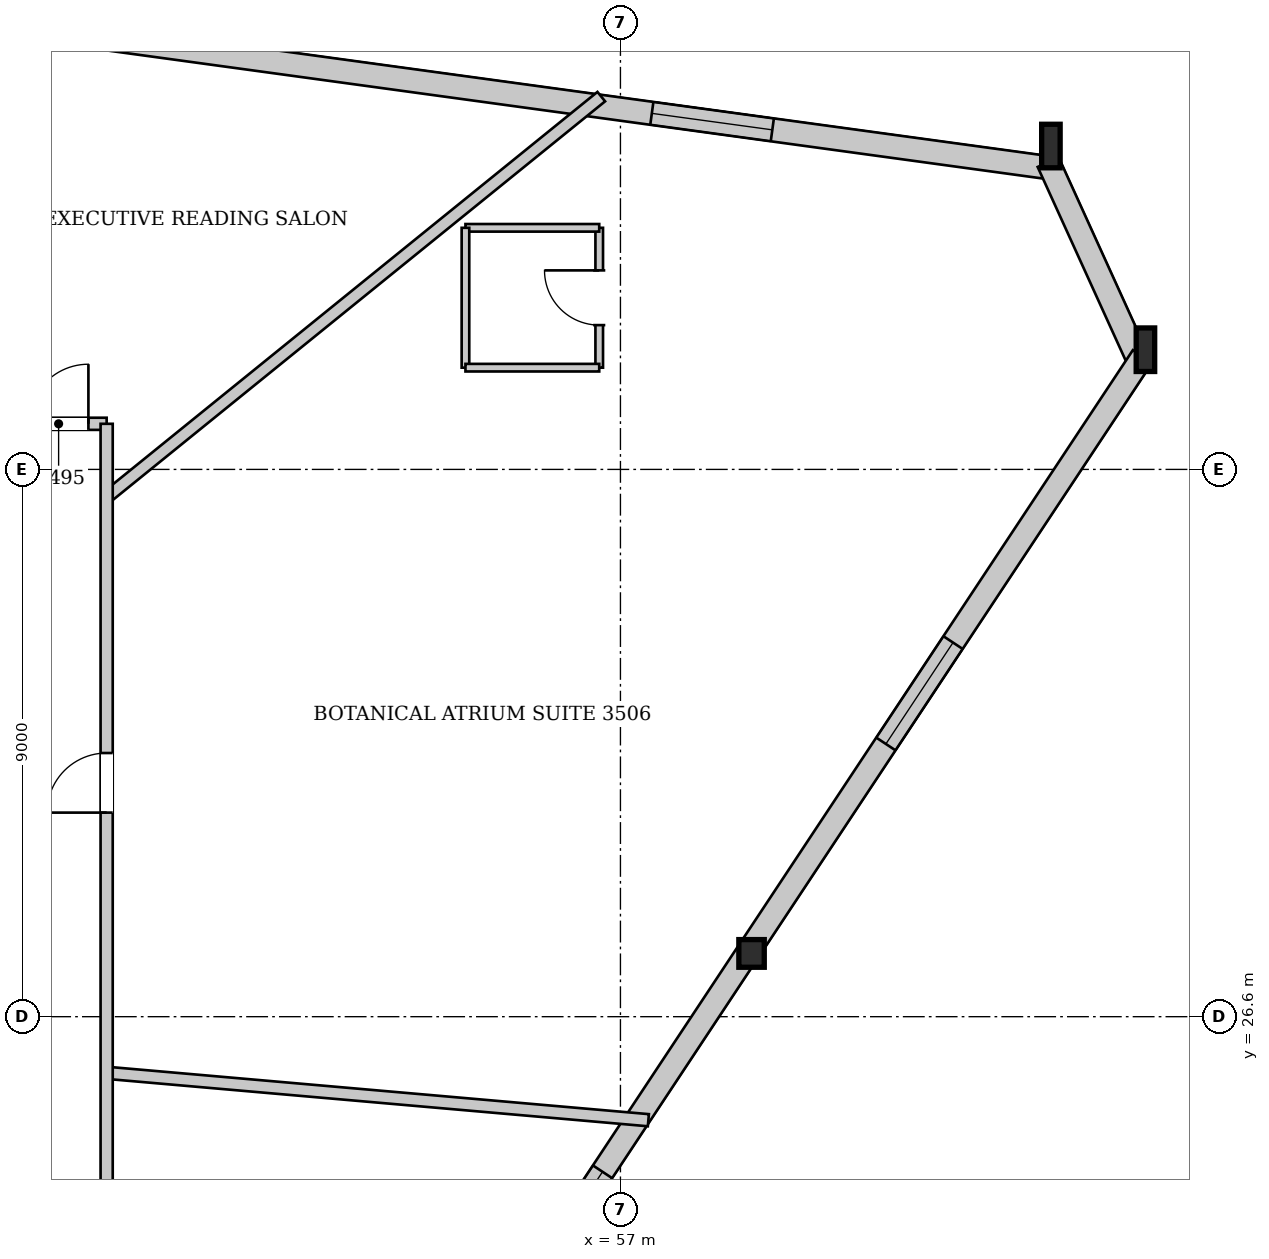
"""IFC4 building model, lengths in metres.
Left out: names, types, materials, properties, quantities, classifications, styles, units other than length and angle.
Written with IfcOpenShell. Run it as: python <this file> out.ifc"""

import sys

from ifc_helpers import new_model, si_unit, direction, frame, frame_2d, origin, origin_2d, place, context, subcontext, project, spatial, rectangle, i_section, extrude, source, transform, mapped, element, fill, save


model = new_model("IFC4")
c1 = context("Model", 3, precision=1e-05, world=origin(), true_north=direction((0.0, 1.0)))
c2 = subcontext(c1, "Body", "Model", "MODEL_VIEW")
j1 = project(units=[si_unit("LENGTHUNIT", "METRE"), si_unit("PLANEANGLEUNIT", "RADIAN")], contexts=[c1])
p1 = place(None, origin())
s1 = spatial("IfcSite", under=j1, at=p1, CompositionType="ELEMENT")
p2 = place(p1, origin())
s2 = spatial("IfcBuilding", under=s1, at=p2, CompositionType="ELEMENT")
p3 = place(p2, frame((0.0, 0.0, 134.1)))
s3 = spatial("IfcBuildingStorey", under=s2, at=p3, CompositionType="ELEMENT", Elevation=134.1)
m1 = source(origin(), c2, "Body", "SweptSolid", [
    extrude(i_section(OverallWidth=0.304, OverallDepth=0.716, WebThickness=0.021, FlangeThickness=0.04, at=origin_2d()), origin(), (0.0, 0.0, 1.0), 3.865),
])
p4 = place(p3, frame((65.744, 37.352, 0.0), z_axis=(-0.056968374746, 0.111915698503, 0.992083404108), x_axis=(-0.891185296634, -0.453639468151, 0.0)))
e1 = element("IfcColumn", 1, at=p4, inside=s3, PredefinedType="COLUMN", context=c2, shape_type="MappedRepresentation", body=[
    mapped(m1, transform((0.0, 0.0, 0.0), x_axis=(1.0, 0.0, 0.0), y_axis=(0.0, 1.0, 0.0), z_axis=(0.0, 0.0, 1.0), scale=1.0)),
])
m2 = source(origin(), c2, "Body", "SweptSolid", [
    extrude(i_section(OverallWidth=0.304, OverallDepth=0.716, WebThickness=0.021, FlangeThickness=0.04, at=origin_2d()), origin(), (0.0, 0.0, 1.0), 3.862),
])
p5 = place(p3, frame((64.208, 40.731, 0.0), z_axis=(-0.066446667597, 0.096666940776, 0.993096341211), x_axis=(-0.824089099315, -0.566460198417, 0.0)))
e2 = element("IfcColumn", 2, at=p5, inside=s3, PredefinedType="COLUMN", context=c2, shape_type="MappedRepresentation", body=[
    mapped(m2, transform((0.0, 0.0, 0.0), x_axis=(1.0, 0.0, 0.0), y_axis=(0.0, 1.0, 0.0), z_axis=(0.0, 0.0, 1.0), scale=1.0)),
])
m3 = source(origin(), c2, "Body", "SweptSolid", [
    extrude(i_section(OverallWidth=0.418, OverallDepth=0.455, WebThickness=0.038, FlangeThickness=0.059, at=origin_2d()), origin(), (0.0, 0.0, 1.0), 3.852),
])
p6 = place(p3, frame((59.194, 27.462, 0.0), z_axis=(-0.019393152912, 0.092592798709, 0.995515182831), x_axis=(-0.978762499952, -0.20499748459, 0.0)))
e3 = element("IfcColumn", 3, at=p6, inside=s3, PredefinedType="COLUMN", context=c2, shape_type="MappedRepresentation", body=[
    mapped(m3, transform((0.0, 0.0, 0.0), x_axis=(1.0, 0.0, 0.0), y_axis=(0.0, 1.0, 0.0), z_axis=(0.0, 0.0, 1.0), scale=1.0)),
])
p7 = place(p3, frame((41.26, 43.68, 0.0), z_axis=(0.0, 0.0, 1.0), x_axis=(0.990765133222, -0.135589272404, 0.0)))
e4 = element("IfcWall", 4, at=p7, inside=s3, PredefinedType="SOLIDWALL", context=c2, shape_type="SweptSolid", body=[
    extrude(rectangle(XDim=23.136, YDim=0.38, at=frame_2d((11.568, 0.0))), origin(), (0.0, 0.0, 1.0), 3.142),
])
p8 = place(p7, frame((5.478, 0.0, 0.222)))
e5 = element("IfcOpeningElement", 5, at=p8, cuts=e4, PredefinedType="OPENING", context=c2, shape_type="SweptSolid", body=[
    extrude(rectangle(XDim=2.0, YDim=2.8, at=frame_2d((1.0, 1.4))), frame((0.0, 0.2, 0.0), z_axis=(0.0, -1.0, 0.0), x_axis=(1.0, 0.0, 0.0)), (0.0, 0.0, 1.0), 0.4),
])
p9 = place(p7, frame((16.408, 0.0, 0.222)))
e6 = element("IfcOpeningElement", 6, at=p9, cuts=e4, PredefinedType="OPENING", context=c2, shape_type="SweptSolid", body=[
    extrude(rectangle(XDim=2.0, YDim=2.8, at=frame_2d((1.0, 1.4))), frame((0.0, 0.2, 0.0), z_axis=(0.0, -1.0, 0.0), x_axis=(1.0, 0.0, 0.0)), (0.0, 0.0, 1.0), 0.4),
])
p10 = place(p3, frame((64.035, 40.653, 0.0), z_axis=(0.0, 0.0, 1.0), x_axis=(0.413892137576, -0.910325929793, 0.0)))
e7 = element("IfcWall", 7, at=p10, inside=s3, PredefinedType="SOLIDWALL", context=c2, shape_type="SweptSolid", body=[
    extrude(rectangle(XDim=3.712, YDim=0.38, at=frame_2d((1.856, 0.0))), origin(), (0.0, 0.0, 1.0), 3.142),
])
p11 = place(p3, frame((65.586, 37.457, 0.0), z_axis=(0.0, 0.0, 1.0), x_axis=(-0.552197199058, -0.833713531947, 0.0)))
e8 = element("IfcWall", 8, at=p11, inside=s3, PredefinedType="SOLIDWALL", context=c2, shape_type="SweptSolid", body=[
    extrude(rectangle(XDim=23.726, YDim=0.38, at=frame_2d((11.863, 0.0))), origin(), (0.0, 0.0, 1.0), 3.142),
])
p12 = place(p11, frame((5.643, 0.0, 0.222)))
e9 = element("IfcOpeningElement", 9, at=p12, cuts=e8, PredefinedType="OPENING", context=c2, shape_type="SweptSolid", body=[
    extrude(rectangle(XDim=2.0, YDim=2.8, at=frame_2d((1.0, 1.4))), frame((0.0, 0.2, 0.0), z_axis=(0.0, -1.0, 0.0), x_axis=(1.0, 0.0, 0.0)), (0.0, 0.0, 1.0), 0.4),
])
p13 = place(p11, frame((16.082, 0.0, 0.222)))
e10 = element("IfcOpeningElement", 10, at=p13, cuts=e8, PredefinedType="OPENING", context=c2, shape_type="SweptSolid", body=[
    extrude(rectangle(XDim=2.0, YDim=2.8, at=frame_2d((1.0, 1.4))), frame((0.0, 0.2, 0.0), z_axis=(0.0, -1.0, 0.0), x_axis=(1.0, 0.0, 0.0)), (0.0, 0.0, 1.0), 0.4),
])
p14 = place(p3, frame((48.55, 25.677, 0.0), z_axis=(0.0, 0.0, 1.0), x_axis=(0.996193836021, -0.087165595704, 0.0)))
e11 = element("IfcWall", 11, at=p14, inside=s3, PredefinedType="PARTITIONING", context=c2, shape_type="SweptSolid", body=[
    extrude(rectangle(XDim=8.943, YDim=0.2, at=frame_2d((4.472, 0.0))), origin(), (0.0, 0.0, 1.0), 3.75),
])
p15 = place(p3, frame((48.55, 35.143, 0.0), z_axis=(0.0, 0.0, 1.0), x_axis=(0.777146006926, 0.6293203349, 0.0)))
e12 = element("IfcWall", 12, at=p15, inside=s3, PredefinedType="PARTITIONING", context=c2, shape_type="SweptSolid", body=[
    extrude(rectangle(XDim=10.468, YDim=0.2, at=frame_2d((5.234, 0.0))), origin(), (0.0, 0.0, 1.0), 3.75),
])
p16 = place(p3, frame((56.651, 37.273, 0.0), z_axis=(0.0, 0.0, 1.0), x_axis=(0.0, 1.0, 0.0)))
e13 = element("IfcWall", 13, at=p16, inside=s3, PredefinedType="PARTITIONING", context=c2, shape_type="SweptSolid", body=[
    extrude(rectangle(XDim=2.3, YDim=0.125, at=frame_2d((1.15, 0.0))), origin(), (0.0, 0.0, 1.0), 3.75),
])
p17 = place(p16, frame((0.7, 0.0, 0.0)))
e14 = element("IfcOpeningElement", 14, at=p17, cuts=e13, PredefinedType="OPENING", context=c2, shape_type="SweptSolid", body=[
    extrude(rectangle(XDim=0.9, YDim=2.1, at=frame_2d((0.45, 1.05))), frame((0.0, 0.073, 0.0), z_axis=(0.0, -1.0, 0.0), x_axis=(1.0, 0.0, 0.0)), (0.0, 0.0, 1.0), 0.145),
])
p18 = place(p3, frame((56.651, 39.573, 0.0), z_axis=(0.0, 0.0, 1.0), x_axis=(-1.0, 0.0, 0.0)))
e15 = element("IfcWall", 15, at=p18, inside=s3, PredefinedType="PARTITIONING", context=c2, shape_type="SweptSolid", body=[
    extrude(rectangle(XDim=2.2, YDim=0.125, at=frame_2d((1.1, 0.0))), origin(), (0.0, 0.0, 1.0), 3.75),
])
p19 = place(p3, frame((54.451, 39.573, 0.0), z_axis=(0.0, 0.0, 1.0), x_axis=(0.0, -1.0, 0.0)))
e16 = element("IfcWall", 16, at=p19, inside=s3, PredefinedType="PARTITIONING", context=c2, shape_type="SweptSolid", body=[
    extrude(rectangle(XDim=2.3, YDim=0.125, at=frame_2d((1.15, 0.0))), origin(), (0.0, 0.0, 1.0), 3.75),
])
p20 = place(p3, frame((54.451, 37.273, 0.0), z_axis=(0.0, 0.0, 1.0), x_axis=(1.0, 0.0, 0.0)))
e17 = element("IfcWall", 17, at=p20, inside=s3, PredefinedType="PARTITIONING", context=c2, shape_type="SweptSolid", body=[
    extrude(rectangle(XDim=2.2, YDim=0.125, at=frame_2d((1.1, 0.0))), origin(), (0.0, 0.0, 1.0), 3.75),
])
p21 = place(p3, frame((27.45, 36.35, 0.0), z_axis=(0.0, 0.0, 1.0), x_axis=(1.0, 0.0, 0.0)))
e18 = element("IfcWall", 18, at=p21, inside=s3, PredefinedType="PARTITIONING", context=c2, shape_type="SweptSolid", body=[
    extrude(rectangle(XDim=21.1, YDim=0.2, at=frame_2d((10.55, 0.0))), origin(), (0.0, 0.0, 1.0), 3.75),
])
p22 = place(p21, frame((4.966, 0.0, 0.0)))
e19 = element("IfcOpeningElement", 19, at=p22, cuts=e18, PredefinedType="OPENING", context=c2, shape_type="SweptSolid", body=[
    extrude(rectangle(XDim=1.6, YDim=2.2, at=frame_2d((0.8, 1.1))), frame((0.0, 0.11, 0.0), z_axis=(0.0, -1.0, 0.0), x_axis=(1.0, 0.0, 0.0)), (0.0, 0.0, 1.0), 0.22),
])
p23 = place(p21, frame((19.82, 0.0, 0.0)))
e20 = element("IfcOpeningElement", 20, at=p23, cuts=e18, PredefinedType="OPENING", context=c2, shape_type="SweptSolid", body=[
    extrude(rectangle(XDim=0.98, YDim=2.15, at=frame_2d((0.49, 1.075))), frame((0.0, 0.11, 0.0), z_axis=(0.0, -1.0, 0.0), x_axis=(1.0, 0.0, 0.0)), (0.0, 0.0, 1.0), 0.22),
])
p24 = place(p3, frame((48.55, 16.85, 0.0), z_axis=(0.0, 0.0, 1.0), x_axis=(0.0, 1.0, 0.0)))
e21 = element("IfcWall", 21, at=p24, inside=s3, PredefinedType="PARTITIONING", context=c2, shape_type="SweptSolid", body=[
    extrude(rectangle(XDim=19.5, YDim=0.2, at=frame_2d((9.75, 0.0))), origin(), (0.0, 0.0, 1.0), 3.75),
])
p25 = place(p24, frame((13.106, 0.0, 0.0)))
e22 = element("IfcOpeningElement", 22, at=p25, cuts=e21, PredefinedType="OPENING", context=c2, shape_type="SweptSolid", body=[
    extrude(rectangle(XDim=0.98, YDim=2.15, at=frame_2d((0.49, 1.075))), frame((0.0, 0.11, 0.0), z_axis=(0.0, -1.0, 0.0), x_axis=(1.0, 0.0, 0.0)), (0.0, 0.0, 1.0), 0.22),
])
m4 = source(origin(), c2, "Body", "SweptSolid", [
    extrude(rectangle(XDim=2.0, YDim=2.8, at=frame_2d((1.0, 1.4))), frame((0.0, 0.03, 0.0), z_axis=(0.0, -1.0, 0.0), x_axis=(1.0, 0.0, 0.0)), (0.0, 0.0, 1.0), 0.06),
])
p26 = place(p9, origin())
e23 = element("IfcWindow", 23, at=p26, inside=s3, PartitioningType="SINGLE_PANEL", PredefinedType="WINDOW", context=c2, shape_type="MappedRepresentation", body=[
    mapped(m4, transform((0.0, 0.0, 0.0), x_axis=(1.0, 0.0, 0.0), y_axis=(0.0, 1.0, 0.0), z_axis=(0.0, 0.0, 1.0), scale=1.0)),
])
fill(e6, e23)
p27 = place(p12, origin())
e24 = element("IfcWindow", 24, at=p27, inside=s3, PartitioningType="SINGLE_PANEL", PredefinedType="WINDOW", context=c2, shape_type="MappedRepresentation", body=[
    mapped(m4, transform((0.0, 0.0, 0.0), x_axis=(1.0, 0.0, 0.0), y_axis=(0.0, 1.0, 0.0), z_axis=(0.0, 0.0, 1.0), scale=1.0)),
])
fill(e9, e24)
p28 = place(p13, origin())
e25 = element("IfcWindow", 25, at=p28, inside=s3, PartitioningType="SINGLE_PANEL", PredefinedType="WINDOW", context=c2, shape_type="MappedRepresentation", body=[
    mapped(m4, transform((0.0, 0.0, 0.0), x_axis=(1.0, 0.0, 0.0), y_axis=(0.0, 1.0, 0.0), z_axis=(0.0, 0.0, 1.0), scale=1.0)),
])
fill(e10, e25)
m5 = source(origin(), c2, "Body", "SweptSolid", [
    extrude(rectangle(XDim=0.9, YDim=2.1, at=frame_2d((0.45, 1.05))), frame((0.0, 0.025, 0.0), z_axis=(0.0, -1.0, 0.0), x_axis=(1.0, 0.0, 0.0)), (0.0, 0.0, 1.0), 0.05),
])
p29 = place(p17, origin())
e26 = element("IfcDoor", 26, at=p29, inside=s3, OperationType="SINGLE_SWING_RIGHT", PredefinedType="DOOR", context=c2, shape_type="MappedRepresentation", body=[
    mapped(m5, transform((0.0, 0.0, 0.0), x_axis=(1.0, 0.0, 0.0), y_axis=(0.0, 1.0, 0.0), z_axis=(0.0, 0.0, 1.0), scale=1.0)),
])
fill(e14, e26)
m6 = source(origin(), c2, "Body", "SweptSolid", [
    extrude(rectangle(XDim=0.98, YDim=2.15, at=frame_2d((0.49, 1.075))), frame((0.0, 0.025, 0.0), z_axis=(0.0, -1.0, 0.0), x_axis=(1.0, 0.0, 0.0)), (0.0, 0.0, 1.0), 0.05),
])
p30 = place(p23, origin())
e27 = element("IfcDoor", 27, at=p30, inside=s3, OperationType="SINGLE_SWING_RIGHT", PredefinedType="DOOR", context=c2, shape_type="MappedRepresentation", body=[
    mapped(m6, transform((0.0, 0.0, 0.0), x_axis=(1.0, 0.0, 0.0), y_axis=(0.0, 1.0, 0.0), z_axis=(0.0, 0.0, 1.0), scale=1.0)),
])
fill(e20, e27)
p31 = place(p25, origin())
e28 = element("IfcDoor", 28, at=p31, inside=s3, OperationType="SINGLE_SWING_LEFT", PredefinedType="DOOR", context=c2, shape_type="MappedRepresentation", body=[
    mapped(m6, transform((0.0, 0.0, 0.0), x_axis=(1.0, 0.0, 0.0), y_axis=(0.0, 1.0, 0.0), z_axis=(0.0, 0.0, 1.0), scale=1.0)),
])
fill(e22, e28)
save(model, sys.argv[1])
